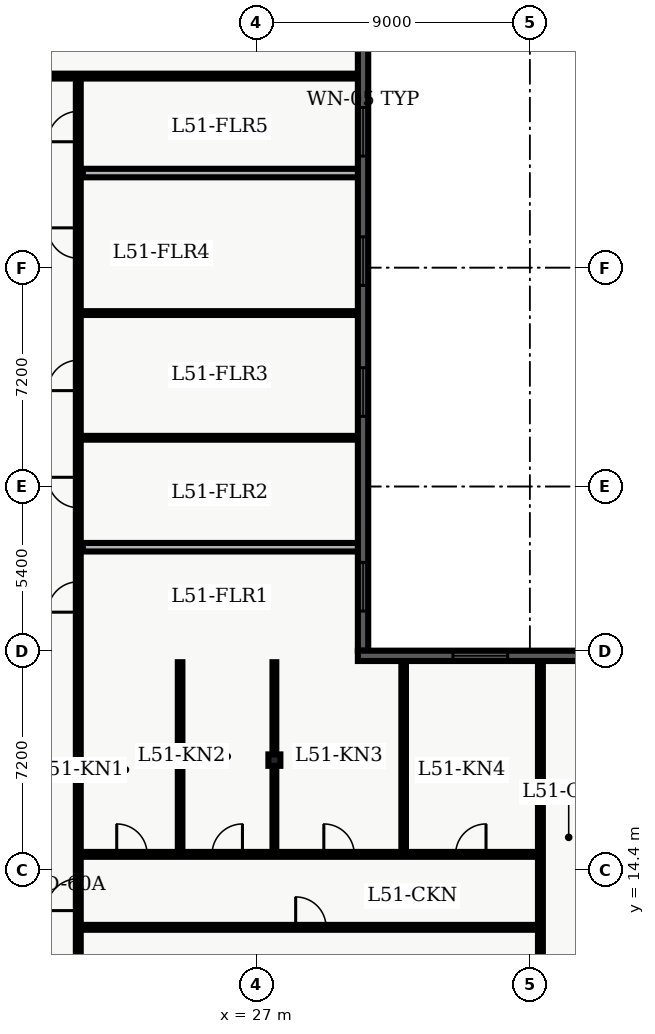
"""IFC4 building model, lengths in metres.
Left out: names, types, materials, properties, quantities, classifications, styles, units other than length and angle.
Written with IfcOpenShell. Run it as: python <this file> out.ifc"""

import sys

from ifc_helpers import new_model, entity, si_unit, converted_unit, direction, frame, origin_with_axes, origin_2d_with_axis, place, context, subcontext, project, spatial, polyline, rectangle, i_section, outline, extrude, element, fill, save


model = new_model("IFC4")
c1 = context("Model", 3, precision=1e-05, world=origin_with_axes(), true_north=direction((0.0, 1.0)))
c2 = subcontext(c1, "Body", "Model", "MODEL_VIEW")
j1 = project(units=[si_unit("LENGTHUNIT", "METRE"), converted_unit("PLANEANGLEUNIT", "DEGREE", entity("IfcPlaneAngleMeasure", 0.017), si_unit("PLANEANGLEUNIT", "RADIAN"), dimensions=[0, 0, 0, 0, 0, 0, 0])], contexts=[c1])
p1 = place(None, origin_with_axes())
s1 = spatial("IfcSite", under=j1, at=p1, CompositionType="ELEMENT")
p2 = place(p1, origin_with_axes())
s2 = spatial("IfcBuilding", under=s1, at=p2, CompositionType="ELEMENT")
p3 = place(p2, frame((0.0, 0.0, 208.2), z_axis=(0.0, 0.0, 1.0), x_axis=(1.0, 0.0, 0.0)))
s3 = spatial("IfcBuildingStorey", under=s2, at=p3, CompositionType="ELEMENT", Elevation=208.2)
p4 = place(p3, frame((27.6, 18.0, 0.0), z_axis=(0.0, 0.0, 1.0), x_axis=(1.0, 0.0, 0.0)))
e1 = element("IfcColumn", 1, at=p4, inside=s3, PredefinedType="COLUMN", context=c2, shape_type="SweptSolid", body=[
    extrude(i_section(OverallWidth=0.394, OverallDepth=0.375, WebThickness=0.017, FlangeThickness=0.028, FilletRadius=0.02, at=origin_2d_with_axis()), origin_with_axes(), (0.0, 0.0, 1.0), 3.9),
])
p5 = place(p3, frame((2.6, 40.5, 0.0), z_axis=(0.0, 0.0, 1.0), x_axis=(1.0, 0.0, 0.0)))
e2 = element("IfcWall", 2, at=p5, inside=s3, PredefinedType="PARTITIONING", context=c2, shape_type="SweptSolid", body=[
    extrude(outline(polyline([(0.0, -0.08), (27.751, -0.08), (27.751, 0.08), (0.0, 0.08), (0.0, -0.08)])), origin_with_axes(), (0.0, 0.0, 1.0), 2.7),
])
p6 = place(p5, frame((2.158, 0.0, 0.0), z_axis=(0.0, 0.0, 1.0), x_axis=(1.0, 0.0, 0.0)))
e3 = element("IfcOpeningElement", 3, at=p6, cuts=e2, PredefinedType="OPENING", context=c2, shape_type="SweptSolid", body=[
    extrude(rectangle(XDim=1.0, YDim=0.18, at=origin_2d_with_axis()), origin_with_axes(), (0.0, 0.0, 1.0), 2.15),
])
p7 = place(p5, frame((7.723, 0.0, 0.0), z_axis=(0.0, 0.0, 1.0), x_axis=(1.0, 0.0, 0.0)))
e4 = element("IfcOpeningElement", 4, at=p7, cuts=e2, PredefinedType="OPENING", context=c2, shape_type="SweptSolid", body=[
    extrude(rectangle(XDim=1.0, YDim=0.18, at=origin_2d_with_axis()), origin_with_axes(), (0.0, 0.0, 1.0), 2.15),
])
p8 = place(p5, frame((11.266, 0.0, 0.0), z_axis=(0.0, 0.0, 1.0), x_axis=(1.0, 0.0, 0.0)))
e5 = element("IfcOpeningElement", 5, at=p8, cuts=e2, PredefinedType="OPENING", context=c2, shape_type="SweptSolid", body=[
    extrude(rectangle(XDim=1.0, YDim=0.18, at=origin_2d_with_axis()), origin_with_axes(), (0.0, 0.0, 1.0), 2.15),
])
p9 = place(p5, frame((15.626, 0.0, 0.0), z_axis=(0.0, 0.0, 1.0), x_axis=(1.0, 0.0, 0.0)))
e6 = element("IfcOpeningElement", 6, at=p9, cuts=e2, PredefinedType="OPENING", context=c2, shape_type="SweptSolid", body=[
    extrude(rectangle(XDim=1.0, YDim=0.18, at=origin_2d_with_axis()), origin_with_axes(), (0.0, 0.0, 1.0), 2.15),
])
p10 = place(p3, frame((21.15, 7.8, 0.0), z_axis=(0.0, 0.0, 1.0), x_axis=(0.0, 1.0, 0.0)))
e7 = element("IfcWall", 7, at=p10, inside=s3, PredefinedType="PARTITIONING", context=c2, shape_type="SweptSolid", body=[
    extrude(outline(polyline([(0.0, -0.08), (32.7, -0.08), (32.7, 0.08), (0.0, 0.08), (0.0, -0.08)])), origin_with_axes(), (0.0, 0.0, 1.0), 2.7),
])
p11 = place(p10, frame((15.566, 0.0, 0.0), z_axis=(0.0, 0.0, 1.0), x_axis=(1.0, 0.0, 0.0)))
e8 = element("IfcOpeningElement", 8, at=p11, cuts=e7, PredefinedType="OPENING", context=c2, shape_type="SweptSolid", body=[
    extrude(rectangle(XDim=1.0, YDim=0.18, at=origin_2d_with_axis()), origin_with_axes(), (0.0, 0.0, 1.0), 2.15),
])
p12 = place(p10, frame((19.003, 0.0, 0.0), z_axis=(0.0, 0.0, 1.0), x_axis=(1.0, 0.0, 0.0)))
e9 = element("IfcOpeningElement", 9, at=p12, cuts=e7, PredefinedType="OPENING", context=c2, shape_type="SweptSolid", body=[
    extrude(rectangle(XDim=1.0, YDim=0.18, at=origin_2d_with_axis()), origin_with_axes(), (0.0, 0.0, 1.0), 2.15),
])
p13 = place(p10, frame((22.854, 0.0, 0.0), z_axis=(0.0, 0.0, 1.0), x_axis=(1.0, 0.0, 0.0)))
e10 = element("IfcOpeningElement", 10, at=p13, cuts=e7, PredefinedType="OPENING", context=c2, shape_type="SweptSolid", body=[
    extrude(rectangle(XDim=1.0, YDim=0.18, at=origin_2d_with_axis()), origin_with_axes(), (0.0, 0.0, 1.0), 2.15),
])
p14 = place(p10, frame((27.208, 0.0, 0.0), z_axis=(0.0, 0.0, 1.0), x_axis=(1.0, 0.0, 0.0)))
e11 = element("IfcOpeningElement", 11, at=p14, cuts=e7, PredefinedType="OPENING", context=c2, shape_type="SweptSolid", body=[
    extrude(rectangle(XDim=1.0, YDim=0.18, at=origin_2d_with_axis()), origin_with_axes(), (0.0, 0.0, 1.0), 2.15),
])
p15 = place(p10, frame((31.041, 0.0, 0.0), z_axis=(0.0, 0.0, 1.0), x_axis=(1.0, 0.0, 0.0)))
e12 = element("IfcOpeningElement", 12, at=p15, cuts=e7, PredefinedType="OPENING", context=c2, shape_type="SweptSolid", body=[
    extrude(rectangle(XDim=1.0, YDim=0.18, at=origin_2d_with_axis()), origin_with_axes(), (0.0, 0.0, 1.0), 2.15),
])
p16 = place(p10, frame((5.775, 0.0, 0.0), z_axis=(0.0, 0.0, 1.0), x_axis=(1.0, 0.0, 0.0)))
e13 = element("IfcOpeningElement", 13, at=p16, cuts=e7, PredefinedType="OPENING", context=c2, shape_type="SweptSolid", body=[
    extrude(rectangle(XDim=1.05, YDim=0.18, at=origin_2d_with_axis()), origin_with_axes(), (0.0, 0.0, 1.0), 2.15),
])
p17 = place(p3, frame((21.3, 25.003, 0.0), z_axis=(0.0, 0.0, 1.0), x_axis=(1.0, 0.0, 0.0)))
e14 = element("IfcWall", 14, at=p17, inside=s3, PredefinedType="PARTITIONING", context=c2, shape_type="SweptSolid", body=[
    extrude(outline(polyline([(0.0, -0.14), (9.051, -0.14), (9.051, 0.14), (0.0, 0.14), (0.0, -0.14)])), origin_with_axes(), (0.0, 0.0, 1.0), 2.7),
])
for number, where, z_axis, x_axis in (
    (15, (21.3, 28.603, 0.0), (0.0, 0.0, 1.0), (1.0, 0.0, 0.0)),
    (16, (21.3, 32.705, 0.0), (0.0, 0.0, 1.0), (1.0, 0.0, 0.0)),
):
    element("IfcWall", number, at=place(p3, frame(where, z_axis=z_axis, x_axis=x_axis)), inside=s3, PredefinedType="PARTITIONING", context=c2, shape_type="SweptSolid", body=[
        extrude(outline(polyline([(0.0, -0.062), (9.051, -0.062), (9.051, 0.062), (0.0, 0.062), (0.0, -0.062)])), origin_with_axes(), (0.0, 0.0, 1.0), 2.7),
    ])
p18 = place(p3, frame((21.3, 37.311, 0.0), z_axis=(0.0, 0.0, 1.0), x_axis=(1.0, 0.0, 0.0)))
e17 = element("IfcWall", 17, at=p18, inside=s3, PredefinedType="PARTITIONING", context=c2, shape_type="SweptSolid", body=[
    extrude(outline(polyline([(0.0, -0.14), (9.051, -0.14), (9.051, 0.14), (0.0, 0.14), (0.0, -0.14)])), origin_with_axes(), (0.0, 0.0, 1.0), 2.7),
])
p19 = place(p3, frame((21.15, 12.5, 0.0), z_axis=(0.0, 0.0, 1.0), x_axis=(1.0, 0.0, 0.0)))
e18 = element("IfcWall", 18, at=p19, inside=s3, PredefinedType="PARTITIONING", context=c2, shape_type="SweptSolid", body=[
    extrude(outline(polyline([(0.0, -0.08), (15.2, -0.08), (15.2, 0.08), (0.0, 0.08), (0.0, -0.08)])), origin_with_axes(), (0.0, 0.0, 1.0), 2.7),
])
p20 = place(p19, frame((7.65, 0.0, 0.0), z_axis=(0.0, 0.0, 1.0), x_axis=(1.0, 0.0, 0.0)))
e19 = element("IfcOpeningElement", 19, at=p20, cuts=e18, PredefinedType="OPENING", context=c2, shape_type="SweptSolid", body=[
    extrude(rectangle(XDim=1.0, YDim=0.18, at=origin_2d_with_axis()), origin_with_axes(), (0.0, 0.0, 1.0), 2.15),
])
p21 = place(p3, frame((21.15, 14.9, 0.0), z_axis=(0.0, 0.0, 1.0), x_axis=(1.0, 0.0, 0.0)))
e20 = element("IfcWall", 20, at=p21, inside=s3, PredefinedType="PARTITIONING", context=c2, shape_type="SweptSolid", body=[
    extrude(outline(polyline([(0.0, -0.08), (15.2, -0.08), (15.2, 0.08), (0.0, 0.08), (0.0, -0.08)])), origin_with_axes(), (0.0, 0.0, 1.0), 2.7),
])
p22 = place(p21, frame((1.764, 0.0, 0.0), z_axis=(0.0, 0.0, 1.0), x_axis=(1.0, 0.0, 0.0)))
e21 = element("IfcOpeningElement", 21, at=p22, cuts=e20, PredefinedType="OPENING", context=c2, shape_type="SweptSolid", body=[
    extrude(rectangle(XDim=1.0, YDim=0.18, at=origin_2d_with_axis()), origin_with_axes(), (0.0, 0.0, 1.0), 2.15),
])
p23 = place(p21, frame((4.899, 0.0, 0.0), z_axis=(0.0, 0.0, 1.0), x_axis=(1.0, 0.0, 0.0)))
e22 = element("IfcOpeningElement", 22, at=p23, cuts=e20, PredefinedType="OPENING", context=c2, shape_type="SweptSolid", body=[
    extrude(rectangle(XDim=1.0, YDim=0.18, at=origin_2d_with_axis()), origin_with_axes(), (0.0, 0.0, 1.0), 2.15),
])
p24 = place(p21, frame((8.576, 0.0, 0.0), z_axis=(0.0, 0.0, 1.0), x_axis=(1.0, 0.0, 0.0)))
e23 = element("IfcOpeningElement", 23, at=p24, cuts=e20, PredefinedType="OPENING", context=c2, shape_type="SweptSolid", body=[
    extrude(rectangle(XDim=1.0, YDim=0.18, at=origin_2d_with_axis()), origin_with_axes(), (0.0, 0.0, 1.0), 2.15),
])
p25 = place(p21, frame((12.911, 0.0, 0.0), z_axis=(0.0, 0.0, 1.0), x_axis=(1.0, 0.0, 0.0)))
e24 = element("IfcOpeningElement", 24, at=p25, cuts=e20, PredefinedType="OPENING", context=c2, shape_type="SweptSolid", body=[
    extrude(rectangle(XDim=1.0, YDim=0.18, at=origin_2d_with_axis()), origin_with_axes(), (0.0, 0.0, 1.0), 2.15),
])
p26 = place(p3, frame((36.35, 4.35, 0.0), z_axis=(0.0, 0.0, 1.0), x_axis=(0.0, 1.0, 0.0)))
e25 = element("IfcWall", 25, at=p26, inside=s3, PredefinedType="PARTITIONING", context=c2, shape_type="SweptSolid", body=[
    extrude(outline(polyline([(0.0, -0.08), (16.95, -0.08), (16.95, 0.08), (0.0, 0.08), (0.0, -0.08)])), origin_with_axes(), (0.0, 0.0, 1.0), 2.7),
])
p27 = place(p3, frame((24.499, 15.02, 0.0), z_axis=(0.0, 0.0, 1.0), x_axis=(0.0, 1.0, 0.0)))
e26 = element("IfcWall", 26, at=p27, inside=s3, PredefinedType="PARTITIONING", context=c2, shape_type="SweptSolid", body=[
    extrude(outline(polyline([(0.0, -0.075), (6.2, -0.075), (6.2, 0.075), (0.0, 0.075), (0.0, -0.075)])), origin_with_axes(), (0.0, 0.0, 1.0), 2.7),
])
p28 = place(p3, frame((27.6, 15.02, 0.0), z_axis=(0.0, 0.0, 1.0), x_axis=(0.0, 1.0, 0.0)))
e27 = element("IfcWall", 27, at=p28, inside=s3, PredefinedType="PARTITIONING", context=c2, shape_type="SweptSolid", body=[
    extrude(outline(polyline([(0.0, -0.062), (6.2, -0.062), (6.2, 0.062), (0.0, 0.062), (0.0, -0.062)])), origin_with_axes(), (0.0, 0.0, 1.0), 2.7),
])
p29 = place(p3, frame((31.852, 15.02, 0.0), z_axis=(0.0, 0.0, 1.0), x_axis=(0.0, 1.0, 0.0)))
e28 = element("IfcWall", 28, at=p29, inside=s3, PredefinedType="PARTITIONING", context=c2, shape_type="SweptSolid", body=[
    extrude(outline(polyline([(0.0, -0.075), (6.245, -0.075), (6.245, 0.075), (0.0, 0.075), (0.0, -0.075)])), origin_with_axes(), (0.0, 0.0, 1.0), 2.7),
])
p30 = place(p3, frame((30.516, 41.62, 0.0), z_axis=(0.0, 0.0, 1.0), x_axis=(0.0, -1.0, 0.0)))
e29 = element("IfcWall", 29, at=p30, inside=s3, PredefinedType="SOLIDWALL", context=c2, shape_type="SweptSolid", body=[
    extrude(outline(polyline([(0.0, -0.17), (20.02, -0.17), (20.02, 0.17), (0.0, 0.17), (0.0, -0.17)])), origin_with_axes(), (0.0, 0.0, 1.0), 3.66),
])
p31 = place(p30, frame((2.952, 0.0, 0.45), z_axis=(0.0, 0.0, 1.0), x_axis=(1.0, 0.0, 0.0)))
e30 = element("IfcOpeningElement", 30, at=p31, cuts=e29, PredefinedType="OPENING", context=c2, shape_type="SweptSolid", body=[
    extrude(rectangle(XDim=1.6, YDim=0.36, at=origin_2d_with_axis()), origin_with_axes(), (0.0, 0.0, 1.0), 2.2),
])
p32 = place(p30, frame((7.207, 0.0, 0.45), z_axis=(0.0, 0.0, 1.0), x_axis=(1.0, 0.0, 0.0)))
e31 = element("IfcOpeningElement", 31, at=p32, cuts=e29, PredefinedType="OPENING", context=c2, shape_type="SweptSolid", body=[
    extrude(rectangle(XDim=1.6, YDim=0.36, at=origin_2d_with_axis()), origin_with_axes(), (0.0, 0.0, 1.0), 2.2),
])
p33 = place(p30, frame((11.512, 0.0, 0.45), z_axis=(0.0, 0.0, 1.0), x_axis=(1.0, 0.0, 0.0)))
e32 = element("IfcOpeningElement", 32, at=p33, cuts=e29, PredefinedType="OPENING", context=c2, shape_type="SweptSolid", body=[
    extrude(rectangle(XDim=1.6, YDim=0.36, at=origin_2d_with_axis()), origin_with_axes(), (0.0, 0.0, 1.0), 2.2),
])
p34 = place(p30, frame((17.917, 0.0, 0.45), z_axis=(0.0, 0.0, 1.0), x_axis=(1.0, 0.0, 0.0)))
e33 = element("IfcOpeningElement", 33, at=p34, cuts=e29, PredefinedType="OPENING", context=c2, shape_type="SweptSolid", body=[
    extrude(rectangle(XDim=1.6, YDim=0.36, at=origin_2d_with_axis()), origin_with_axes(), (0.0, 0.0, 1.0), 2.2),
])
p35 = place(p3, frame((30.346, 21.43, 0.0), z_axis=(0.0, 0.0, 1.0), x_axis=(1.0, 0.0, 0.0)))
e34 = element("IfcWall", 34, at=p35, inside=s3, PredefinedType="SOLIDWALL", context=c2, shape_type="SweptSolid", body=[
    extrude(outline(polyline([(0.0, -0.17), (8.054, -0.17), (8.054, 0.17), (0.0, 0.17), (0.0, -0.17)])), origin_with_axes(), (0.0, 0.0, 1.0), 3.66),
])
p36 = place(p35, frame((4.027, 0.0, 0.45), z_axis=(0.0, 0.0, 1.0), x_axis=(1.0, 0.0, 0.0)))
e35 = element("IfcOpeningElement", 35, at=p36, cuts=e34, PredefinedType="OPENING", context=c2, shape_type="SweptSolid", body=[
    extrude(rectangle(XDim=1.8, YDim=0.36, at=origin_2d_with_axis()), origin_with_axes(), (0.0, 0.0, 1.0), 2.1),
])
p37 = place(p10, frame((15.566, 0.0, 0.0), z_axis=(0.0, 0.0, 1.0), x_axis=(1.0, 0.0, 0.0)))
e36 = element("IfcDoor", 36, at=p37, inside=s3, OperationType="SINGLE_SWING_LEFT", PredefinedType="DOOR", context=c2, shape_type="SweptSolid", body=[
    extrude(rectangle(XDim=1.0, YDim=0.09, at=origin_2d_with_axis()), origin_with_axes(), (0.0, 0.0, 1.0), 2.15),
])
fill(e8, e36)
p38 = place(p10, frame((19.003, 0.0, 0.0), z_axis=(0.0, 0.0, 1.0), x_axis=(1.0, 0.0, 0.0)))
e37 = element("IfcDoor", 37, at=p38, inside=s3, OperationType="SINGLE_SWING_RIGHT", PredefinedType="DOOR", context=c2, shape_type="SweptSolid", body=[
    extrude(rectangle(XDim=1.0, YDim=0.09, at=origin_2d_with_axis()), origin_with_axes(), (0.0, 0.0, 1.0), 2.15),
])
fill(e9, e37)
p39 = place(p10, frame((22.854, 0.0, 0.0), z_axis=(0.0, 0.0, 1.0), x_axis=(1.0, 0.0, 0.0)))
e38 = element("IfcDoor", 38, at=p39, inside=s3, OperationType="SINGLE_SWING_LEFT", PredefinedType="DOOR", context=c2, shape_type="SweptSolid", body=[
    extrude(rectangle(XDim=1.0, YDim=0.09, at=origin_2d_with_axis()), origin_with_axes(), (0.0, 0.0, 1.0), 2.15),
])
fill(e10, e38)
p40 = place(p10, frame((27.208, 0.0, 0.0), z_axis=(0.0, 0.0, 1.0), x_axis=(1.0, 0.0, 0.0)))
e39 = element("IfcDoor", 39, at=p40, inside=s3, OperationType="SINGLE_SWING_RIGHT", PredefinedType="DOOR", context=c2, shape_type="SweptSolid", body=[
    extrude(rectangle(XDim=1.0, YDim=0.09, at=origin_2d_with_axis()), origin_with_axes(), (0.0, 0.0, 1.0), 2.15),
])
fill(e11, e39)
p41 = place(p10, frame((31.041, 0.0, 0.0), z_axis=(0.0, 0.0, 1.0), x_axis=(1.0, 0.0, 0.0)))
e40 = element("IfcDoor", 40, at=p41, inside=s3, OperationType="SINGLE_SWING_LEFT", PredefinedType="DOOR", context=c2, shape_type="SweptSolid", body=[
    extrude(rectangle(XDim=1.0, YDim=0.09, at=origin_2d_with_axis()), origin_with_axes(), (0.0, 0.0, 1.0), 2.15),
])
fill(e12, e40)
p42 = place(p10, frame((5.775, 0.0, 0.0), z_axis=(0.0, 0.0, 1.0), x_axis=(1.0, 0.0, 0.0)))
e41 = element("IfcDoor", 41, at=p42, inside=s3, OperationType="SINGLE_SWING_LEFT", PredefinedType="DOOR", context=c2, shape_type="SweptSolid", body=[
    extrude(rectangle(XDim=1.05, YDim=0.09, at=origin_2d_with_axis()), origin_with_axes(), (0.0, 0.0, 1.0), 2.15),
])
fill(e13, e41)
p43 = place(p19, frame((7.65, 0.0, 0.0), z_axis=(0.0, 0.0, 1.0), x_axis=(1.0, 0.0, 0.0)))
e42 = element("IfcDoor", 42, at=p43, inside=s3, OperationType="SINGLE_SWING_LEFT", PredefinedType="DOOR", context=c2, shape_type="SweptSolid", body=[
    extrude(rectangle(XDim=1.0, YDim=0.09, at=origin_2d_with_axis()), origin_with_axes(), (0.0, 0.0, 1.0), 2.15),
])
fill(e19, e42)
p44 = place(p21, frame((1.764, 0.0, 0.0), z_axis=(0.0, 0.0, 1.0), x_axis=(1.0, 0.0, 0.0)))
e43 = element("IfcDoor", 43, at=p44, inside=s3, OperationType="SINGLE_SWING_LEFT", PredefinedType="DOOR", context=c2, shape_type="SweptSolid", body=[
    extrude(rectangle(XDim=1.0, YDim=0.09, at=origin_2d_with_axis()), origin_with_axes(), (0.0, 0.0, 1.0), 2.15),
])
fill(e21, e43)
p45 = place(p21, frame((4.899, 0.0, 0.0), z_axis=(0.0, 0.0, 1.0), x_axis=(1.0, 0.0, 0.0)))
e44 = element("IfcDoor", 44, at=p45, inside=s3, OperationType="SINGLE_SWING_RIGHT", PredefinedType="DOOR", context=c2, shape_type="SweptSolid", body=[
    extrude(rectangle(XDim=1.0, YDim=0.09, at=origin_2d_with_axis()), origin_with_axes(), (0.0, 0.0, 1.0), 2.15),
])
fill(e22, e44)
p46 = place(p21, frame((8.576, 0.0, 0.0), z_axis=(0.0, 0.0, 1.0), x_axis=(1.0, 0.0, 0.0)))
e45 = element("IfcDoor", 45, at=p46, inside=s3, OperationType="SINGLE_SWING_LEFT", PredefinedType="DOOR", context=c2, shape_type="SweptSolid", body=[
    extrude(rectangle(XDim=1.0, YDim=0.09, at=origin_2d_with_axis()), origin_with_axes(), (0.0, 0.0, 1.0), 2.15),
])
fill(e23, e45)
p47 = place(p21, frame((12.911, 0.0, 0.0), z_axis=(0.0, 0.0, 1.0), x_axis=(1.0, 0.0, 0.0)))
e46 = element("IfcDoor", 46, at=p47, inside=s3, OperationType="SINGLE_SWING_RIGHT", PredefinedType="DOOR", context=c2, shape_type="SweptSolid", body=[
    extrude(rectangle(XDim=1.0, YDim=0.09, at=origin_2d_with_axis()), origin_with_axes(), (0.0, 0.0, 1.0), 2.15),
])
fill(e24, e46)
p48 = place(p30, frame((2.952, 0.0, 0.45), z_axis=(0.0, 0.0, 1.0), x_axis=(1.0, 0.0, 0.0)))
e47 = element("IfcWindow", 47, at=p48, inside=s3, PredefinedType="WINDOW", context=c2, shape_type="SweptSolid", body=[
    extrude(rectangle(XDim=1.6, YDim=0.09, at=origin_2d_with_axis()), origin_with_axes(), (0.0, 0.0, 1.0), 2.2),
])
fill(e30, e47)
p49 = place(p30, frame((7.207, 0.0, 0.45), z_axis=(0.0, 0.0, 1.0), x_axis=(1.0, 0.0, 0.0)))
e48 = element("IfcWindow", 48, at=p49, inside=s3, PredefinedType="WINDOW", context=c2, shape_type="SweptSolid", body=[
    extrude(rectangle(XDim=1.6, YDim=0.09, at=origin_2d_with_axis()), origin_with_axes(), (0.0, 0.0, 1.0), 2.2),
])
fill(e31, e48)
p50 = place(p30, frame((11.512, 0.0, 0.45), z_axis=(0.0, 0.0, 1.0), x_axis=(1.0, 0.0, 0.0)))
e49 = element("IfcWindow", 49, at=p50, inside=s3, PredefinedType="WINDOW", context=c2, shape_type="SweptSolid", body=[
    extrude(rectangle(XDim=1.6, YDim=0.09, at=origin_2d_with_axis()), origin_with_axes(), (0.0, 0.0, 1.0), 2.2),
])
fill(e32, e49)
p51 = place(p30, frame((17.917, 0.0, 0.45), z_axis=(0.0, 0.0, 1.0), x_axis=(1.0, 0.0, 0.0)))
e50 = element("IfcWindow", 50, at=p51, inside=s3, PredefinedType="WINDOW", context=c2, shape_type="SweptSolid", body=[
    extrude(rectangle(XDim=1.6, YDim=0.09, at=origin_2d_with_axis()), origin_with_axes(), (0.0, 0.0, 1.0), 2.2),
])
fill(e33, e50)
p52 = place(p35, frame((4.027, 0.0, 0.45), z_axis=(0.0, 0.0, 1.0), x_axis=(1.0, 0.0, 0.0)))
e51 = element("IfcWindow", 51, at=p52, inside=s3, PredefinedType="WINDOW", context=c2, shape_type="SweptSolid", body=[
    extrude(rectangle(XDim=1.8, YDim=0.09, at=origin_2d_with_axis()), origin_with_axes(), (0.0, 0.0, 1.0), 2.1),
])
fill(e35, e51)
save(model, sys.argv[1])
